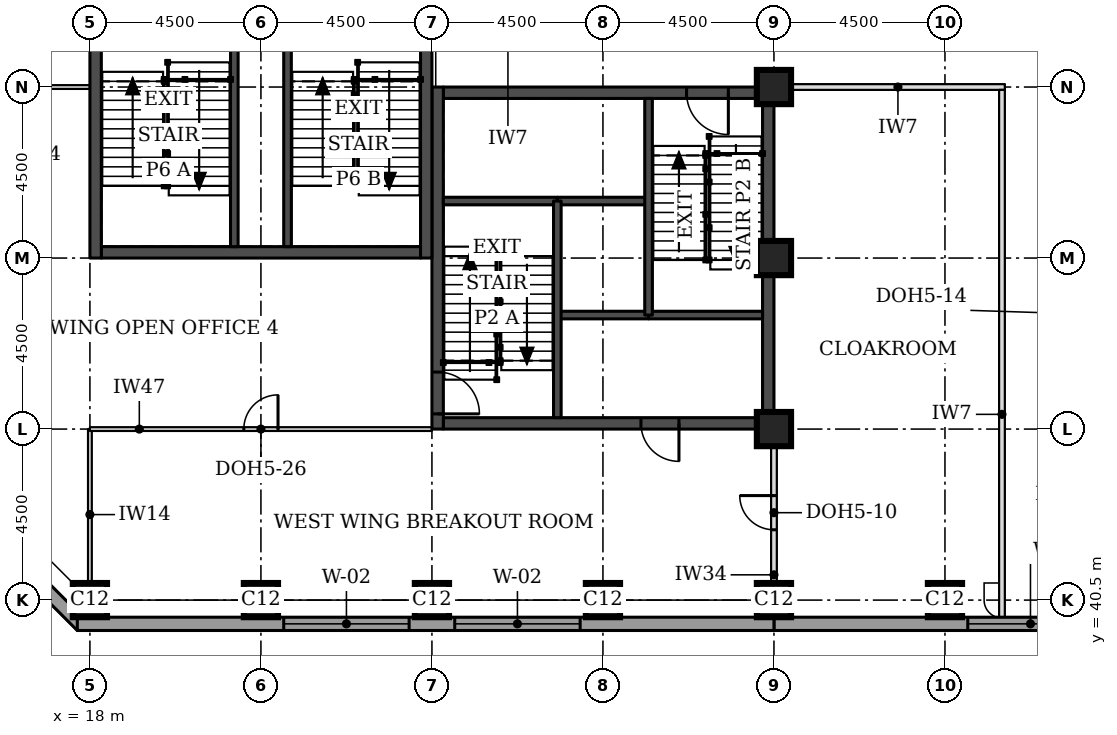
"""IFC4 building model, lengths in metres.
Left out: names, types, materials, properties, quantities, classifications, styles, units other than length and angle.
Written with IfcOpenShell. Run it as: python <this file> out.ifc"""

import sys

from ifc_helpers import new_model, si_unit, direction, frame, frame_2d, origin, origin_2d, place, context, subcontext, project, spatial, rectangle, extrude, element, fill, save


model = new_model("IFC4")
c1 = context("Model", 3, precision=1e-05, world=origin(), true_north=direction((0.0, 1.0)))
c2 = subcontext(c1, "Body", "Model", "MODEL_VIEW")
j1 = project(units=[si_unit("LENGTHUNIT", "METRE"), si_unit("PLANEANGLEUNIT", "RADIAN")], contexts=[c1])
p1 = place(None, origin())
s1 = spatial("IfcSite", under=j1, at=p1, CompositionType="ELEMENT")
p2 = place(p1, origin())
s2 = spatial("IfcBuilding", under=s1, at=p2, CompositionType="ELEMENT")
p3 = place(p2, frame((0.0, 0.0, 177.3)))
s3 = spatial("IfcBuildingStorey", under=s2, at=p3, CompositionType="ELEMENT", Elevation=177.3)
for number, where, z_axis, x_axis in (
    (1, (18.0, 40.5, 0.0), (0.0, 0.0, 1.0), (1.0, 0.0, 0.0)),
    (2, (22.5, 40.5, 0.0), (0.0, 0.0, 1.0), (1.0, 0.0, 0.0)),
    (3, (27.0, 40.5, 0.0), (0.0, 0.0, 1.0), (1.0, 0.0, 0.0)),
    (4, (31.5, 40.5, 0.0), (0.0, 0.0, 1.0), (1.0, 0.0, 0.0)),
    (5, (36.0, 40.5, 0.0), (0.0, 0.0, 1.0), (1.0, 0.0, 0.0)),
    (6, (40.5, 40.5, 0.0), (0.0, 0.0, 1.0), (1.0, 0.0, 0.0)),
    (7, (36.0, 45.0, 0.0), (0.0, 0.0, 1.0), (1.0, 0.0, 0.0)),
    (8, (36.0, 49.5, 0.0), (0.0, 0.0, 1.0), (1.0, 0.0, 0.0)),
    (9, (36.0, 54.0, 0.0), (0.0, 0.0, 1.0), (1.0, 0.0, 0.0)),
):
    element("IfcColumn", number, at=place(p3, frame(where, z_axis=z_axis, x_axis=x_axis)), inside=s3, PredefinedType="COLUMN", context=c2, shape_type="SweptSolid", body=[
        extrude(rectangle(XDim=0.9, YDim=0.9, at=origin_2d()), origin(), (0.0, 0.0, 1.0), 3.7),
    ])
p4 = place(p3, frame((27.3, 45.15, 0.0), z_axis=(0.0, 0.0, 1.0), x_axis=(1.0, 0.0, 0.0)))
e10 = element("IfcWall", 10, at=p4, inside=s3, PredefinedType="SHEAR", context=c2, shape_type="SweptSolid", body=[
    extrude(rectangle(XDim=8.4, YDim=0.3, at=frame_2d((4.2, 0.0))), origin(), (0.0, 0.0, 1.0), 3.7),
])
p5 = place(p4, frame((5.2, 0.0, 0.0)))
e11 = element("IfcOpeningElement", 11, at=p5, cuts=e10, PredefinedType="OPENING", context=c2, shape_type="SweptSolid", body=[
    extrude(rectangle(XDim=1.0, YDim=2.1, at=frame_2d((0.5, 1.05))), frame((0.0, 0.16, 0.0), z_axis=(0.0, -1.0, 0.0), x_axis=(1.0, 0.0, 0.0)), (0.0, 0.0, 1.0), 0.32),
])
p6 = place(p3, frame((27.3, 53.85, 0.0), z_axis=(0.0, 0.0, 1.0), x_axis=(1.0, 0.0, 0.0)))
e12 = element("IfcWall", 12, at=p6, inside=s3, PredefinedType="SHEAR", context=c2, shape_type="SweptSolid", body=[
    extrude(rectangle(XDim=8.4, YDim=0.3, at=frame_2d((4.2, 0.0))), origin(), (0.0, 0.0, 1.0), 3.7),
])
p7 = place(p6, frame((6.4, 0.0, 0.0)))
e13 = element("IfcOpeningElement", 13, at=p7, cuts=e12, PredefinedType="OPENING", context=c2, shape_type="SweptSolid", body=[
    extrude(rectangle(XDim=1.1, YDim=2.1, at=frame_2d((0.55, 1.05))), frame((0.0, 0.16, 0.0), z_axis=(0.0, -1.0, 0.0), x_axis=(1.0, 0.0, 0.0)), (0.0, 0.0, 1.0), 0.32),
])
p8 = place(p3, frame((27.15, 45.0, 0.0), z_axis=(0.0, 0.0, 1.0), x_axis=(0.0, 1.0, 0.0)))
e14 = element("IfcWall", 14, at=p8, inside=s3, PredefinedType="SHEAR", context=c2, shape_type="SweptSolid", body=[
    extrude(rectangle(XDim=9.0, YDim=0.3, at=frame_2d((4.5, 0.0))), origin(), (0.0, 0.0, 1.0), 3.7),
])
p9 = place(p8, frame((0.4, 0.0, 0.0)))
e15 = element("IfcOpeningElement", 15, at=p9, cuts=e14, PredefinedType="OPENING", context=c2, shape_type="SweptSolid", body=[
    extrude(rectangle(XDim=1.1, YDim=2.1, at=frame_2d((0.55, 1.05))), frame((0.0, 0.16, 0.0), z_axis=(0.0, -1.0, 0.0), x_axis=(1.0, 0.0, 0.0)), (0.0, 0.0, 1.0), 0.32),
])
p10 = place(p3, frame((35.85, 45.0, 0.0), z_axis=(0.0, 0.0, 1.0), x_axis=(0.0, 1.0, 0.0)))
e16 = element("IfcWall", 16, at=p10, inside=s3, PredefinedType="SHEAR", context=c2, shape_type="SweptSolid", body=[
    extrude(rectangle(XDim=9.0, YDim=0.3, at=frame_2d((4.5, 0.0))), origin(), (0.0, 0.0, 1.0), 3.7),
])
p11 = place(p3, frame((18.3, 49.65, 0.0), z_axis=(0.0, 0.0, 1.0), x_axis=(1.0, 0.0, 0.0)))
e17 = element("IfcWall", 17, at=p11, inside=s3, PredefinedType="SHEAR", context=c2, shape_type="SweptSolid", body=[
    extrude(rectangle(XDim=8.4, YDim=0.3, at=frame_2d((4.2, 0.0))), origin(), (0.0, 0.0, 1.0), 3.7),
])
p12 = place(p3, frame((18.15, 49.5, 0.0), z_axis=(0.0, 0.0, 1.0), x_axis=(0.0, 1.0, 0.0)))
e18 = element("IfcWall", 18, at=p12, inside=s3, PredefinedType="SHEAR", context=c2, shape_type="SweptSolid", body=[
    extrude(rectangle(XDim=9.0, YDim=0.3, at=frame_2d((4.5, 0.0))), origin(), (0.0, 0.0, 1.0), 3.7),
])
p13 = place(p3, frame((26.85, 49.5, 0.0), z_axis=(0.0, 0.0, 1.0), x_axis=(0.0, 1.0, 0.0)))
e19 = element("IfcWall", 19, at=p13, inside=s3, PredefinedType="SHEAR", context=c2, shape_type="SweptSolid", body=[
    extrude(rectangle(XDim=9.0, YDim=0.3, at=frame_2d((4.5, 0.0))), origin(), (0.0, 0.0, 1.0), 3.7),
])
p14 = place(p13, frame((6.6, 0.0, 0.0)))
e20 = element("IfcOpeningElement", 20, at=p14, cuts=e19, PredefinedType="OPENING", context=c2, shape_type="SweptSolid", body=[
    extrude(rectangle(XDim=1.8, YDim=2.1, at=frame_2d((0.9, 1.05))), frame((0.0, 0.16, 0.0), z_axis=(0.0, -1.0, 0.0), x_axis=(1.0, 0.0, 0.0)), (0.0, 0.0, 1.0), 0.32),
])
p15 = place(p3, frame((36.0, 39.875, 0.0), z_axis=(0.0, 0.0, 1.0), x_axis=(1.0, 0.0, 0.0)))
e21 = element("IfcWall", 21, at=p15, inside=s3, PredefinedType="STANDARD", context=c2, shape_type="SweptSolid", body=[
    extrude(rectangle(XDim=36.331, YDim=0.35, at=frame_2d((18.166, 0.0))), origin(), (0.0, 0.0, 1.0), 3.525),
])
p16 = place(p15, frame((5.1, 0.0, 0.9)))
e22 = element("IfcOpeningElement", 22, at=p16, cuts=e21, PredefinedType="OPENING", context=c2, shape_type="SweptSolid", body=[
    extrude(rectangle(XDim=3.3, YDim=1.9, at=frame_2d((1.65, 0.95))), frame((0.0, 0.185, 0.0), z_axis=(0.0, -1.0, 0.0), x_axis=(1.0, 0.0, 0.0)), (0.0, 0.0, 1.0), 0.37),
])
p17 = place(p15, frame((9.6, 0.0, 0.9)))
e23 = element("IfcOpeningElement", 23, at=p17, cuts=e21, PredefinedType="OPENING", context=c2, shape_type="SweptSolid", body=[
    extrude(rectangle(XDim=3.3, YDim=1.9, at=frame_2d((1.65, 0.95))), frame((0.0, 0.185, 0.0), z_axis=(0.0, -1.0, 0.0), x_axis=(1.0, 0.0, 0.0)), (0.0, 0.0, 1.0), 0.37),
])
p18 = place(p15, frame((14.1, 0.0, 0.9)))
e24 = element("IfcOpeningElement", 24, at=p18, cuts=e21, PredefinedType="OPENING", context=c2, shape_type="SweptSolid", body=[
    extrude(rectangle(XDim=3.3, YDim=1.9, at=frame_2d((1.65, 0.95))), frame((0.0, 0.185, 0.0), z_axis=(0.0, -1.0, 0.0), x_axis=(1.0, 0.0, 0.0)), (0.0, 0.0, 1.0), 0.37),
])
p19 = place(p15, frame((18.6, 0.0, 0.9)))
e25 = element("IfcOpeningElement", 25, at=p19, cuts=e21, PredefinedType="OPENING", context=c2, shape_type="SweptSolid", body=[
    extrude(rectangle(XDim=3.3, YDim=1.9, at=frame_2d((1.65, 0.95))), frame((0.0, 0.185, 0.0), z_axis=(0.0, -1.0, 0.0), x_axis=(1.0, 0.0, 0.0)), (0.0, 0.0, 1.0), 0.37),
])
p20 = place(p15, frame((23.1, 0.0, 0.9)))
e26 = element("IfcOpeningElement", 26, at=p20, cuts=e21, PredefinedType="OPENING", context=c2, shape_type="SweptSolid", body=[
    extrude(rectangle(XDim=3.3, YDim=1.9, at=frame_2d((1.65, 0.95))), frame((0.0, 0.185, 0.0), z_axis=(0.0, -1.0, 0.0), x_axis=(1.0, 0.0, 0.0)), (0.0, 0.0, 1.0), 0.37),
])
p21 = place(p15, frame((27.6, 0.0, 0.9)))
e27 = element("IfcOpeningElement", 27, at=p21, cuts=e21, PredefinedType="OPENING", context=c2, shape_type="SweptSolid", body=[
    extrude(rectangle(XDim=3.3, YDim=1.9, at=frame_2d((1.65, 0.95))), frame((0.0, 0.185, 0.0), z_axis=(0.0, -1.0, 0.0), x_axis=(1.0, 0.0, 0.0)), (0.0, 0.0, 1.0), 0.37),
])
p22 = place(p3, frame((12.824, 44.792, 0.0), z_axis=(0.0, 0.0, 1.0), x_axis=(0.707106781187, -0.707106781187, 0.0)))
e28 = element("IfcWall", 28, at=p22, inside=s3, PredefinedType="STANDARD", context=c2, shape_type="SweptSolid", body=[
    extrude(rectangle(XDim=7.027, YDim=0.35, at=frame_2d((3.513, 0.0))), origin(), (0.0, 0.0, 1.0), 3.525),
])
p23 = place(p22, frame((1.863, 0.0, 0.9)))
e29 = element("IfcOpeningElement", 29, at=p23, cuts=e28, PredefinedType="OPENING", context=c2, shape_type="SweptSolid", body=[
    extrude(rectangle(XDim=3.3, YDim=1.9, at=frame_2d((1.65, 0.95))), frame((0.0, 0.185, 0.0), z_axis=(0.0, -1.0, 0.0), x_axis=(1.0, 0.0, 0.0)), (0.0, 0.0, 1.0), 0.37),
])
p24 = place(p3, frame((17.669, 39.875, 0.0), z_axis=(0.0, 0.0, 1.0), x_axis=(1.0, 0.0, 0.0)))
e30 = element("IfcWall", 30, at=p24, inside=s3, PredefinedType="STANDARD", context=c2, shape_type="SweptSolid", body=[
    extrude(rectangle(XDim=18.331, YDim=0.35, at=frame_2d((9.166, 0.0))), origin(), (0.0, 0.0, 1.0), 3.525),
])
p25 = place(p24, frame((5.431, 0.0, 0.9)))
e31 = element("IfcOpeningElement", 31, at=p25, cuts=e30, PredefinedType="OPENING", context=c2, shape_type="SweptSolid", body=[
    extrude(rectangle(XDim=3.3, YDim=1.9, at=frame_2d((1.65, 0.95))), frame((0.0, 0.185, 0.0), z_axis=(0.0, -1.0, 0.0), x_axis=(1.0, 0.0, 0.0)), (0.0, 0.0, 1.0), 0.37),
])
p26 = place(p24, frame((9.931, 0.0, 0.9)))
e32 = element("IfcOpeningElement", 32, at=p26, cuts=e30, PredefinedType="OPENING", context=c2, shape_type="SweptSolid", body=[
    extrude(rectangle(XDim=3.3, YDim=1.9, at=frame_2d((1.65, 0.95))), frame((0.0, 0.185, 0.0), z_axis=(0.0, -1.0, 0.0), x_axis=(1.0, 0.0, 0.0)), (0.0, 0.0, 1.0), 0.37),
])
p27 = place(p3, frame((36.45, 54.0, 0.0), z_axis=(0.0, 0.0, 1.0), x_axis=(1.0, 0.0, 0.0)))
e33 = element("IfcWall", 33, at=p27, inside=s3, PredefinedType="PARTITIONING", context=c2, shape_type="SweptSolid", body=[
    extrude(rectangle(XDim=5.625, YDim=0.15, at=frame_2d((2.812, 0.0))), origin(), (0.0, 0.0, 1.0), 3.55),
])
p28 = place(p3, frame((42.0, 40.05, 0.0), z_axis=(0.0, 0.0, 1.0), x_axis=(0.0, 1.0, 0.0)))
e34 = element("IfcWall", 34, at=p28, inside=s3, PredefinedType="PARTITIONING", context=c2, shape_type="SweptSolid", body=[
    extrude(rectangle(XDim=13.875, YDim=0.15, at=frame_2d((6.938, 0.0))), origin(), (0.0, 0.0, 1.0), 3.55),
])
p29 = place(p3, frame((36.0, 40.95, 0.0), z_axis=(0.0, 0.0, 1.0), x_axis=(0.0, 1.0, 0.0)))
e35 = element("IfcWall", 35, at=p29, inside=s3, PredefinedType="PARTITIONING", context=c2, shape_type="SweptSolid", body=[
    extrude(rectangle(XDim=3.63, YDim=0.15, at=frame_2d((1.815, 0.0))), origin(), (0.0, 0.0, 1.0), 2.8),
])
p30 = place(p29, frame((1.4, 0.0, 0.0)))
e36 = element("IfcOpeningElement", 36, at=p30, cuts=e35, PredefinedType="OPENING", context=c2, shape_type="SweptSolid", body=[
    extrude(rectangle(XDim=0.9, YDim=2.1, at=frame_2d((0.45, 1.05))), frame((0.0, 0.085, 0.0), z_axis=(0.0, -1.0, 0.0), x_axis=(1.0, 0.0, 0.0)), (0.0, 0.0, 1.0), 0.17),
])
p31 = place(p3, frame((13.5, 54.0, 0.0), z_axis=(0.0, 0.0, 1.0), x_axis=(1.0, 0.0, 0.0)))
e37 = element("IfcWall", 37, at=p31, inside=s3, PredefinedType="PARTITIONING", context=c2, shape_type="SweptSolid", body=[
    extrude(rectangle(XDim=4.5, YDim=0.1, at=frame_2d((2.25, 0.0))), origin(), (0.0, 0.0, 1.0), 3.55),
])
p32 = place(p31, frame((1.8, 0.0, 0.0)))
e38 = element("IfcOpeningElement", 38, at=p32, cuts=e37, PredefinedType="OPENING", context=c2, shape_type="SweptSolid", body=[
    extrude(rectangle(XDim=0.9, YDim=2.1, at=frame_2d((0.45, 1.05))), frame((0.0, 0.06, 0.0), z_axis=(0.0, -1.0, 0.0), x_axis=(1.0, 0.0, 0.0)), (0.0, 0.0, 1.0), 0.12),
])
p33 = place(p3, frame((18.0, 40.5, 0.0), z_axis=(0.0, 0.0, 1.0), x_axis=(0.0, 1.0, 0.0)))
e39 = element("IfcWall", 39, at=p33, inside=s3, PredefinedType="PARTITIONING", context=c2, shape_type="SweptSolid", body=[
    extrude(rectangle(XDim=4.5, YDim=0.1, at=frame_2d((2.25, 0.0))), origin(), (0.0, 0.0, 1.0), 3.55),
])
p34 = place(p3, frame((18.0, 45.0, 0.0), z_axis=(0.0, 0.0, 1.0), x_axis=(1.0, 0.0, 0.0)))
e40 = element("IfcWall", 40, at=p34, inside=s3, PredefinedType="PARTITIONING", context=c2, shape_type="SweptSolid", body=[
    extrude(rectangle(XDim=9.0, YDim=0.1, at=frame_2d((4.5, 0.0))), origin(), (0.0, 0.0, 1.0), 2.55),
])
p35 = place(p34, frame((4.05, 0.0, 0.0)))
e41 = element("IfcOpeningElement", 41, at=p35, cuts=e40, PredefinedType="OPENING", context=c2, shape_type="SweptSolid", body=[
    extrude(rectangle(XDim=0.9, YDim=2.1, at=frame_2d((0.45, 1.05))), frame((0.0, 0.06, 0.0), z_axis=(0.0, -1.0, 0.0), x_axis=(1.0, 0.0, 0.0)), (0.0, 0.0, 1.0), 0.12),
])
p36 = place(p3, frame((30.3, 48.0, 0.0), z_axis=(0.0, 0.0, 1.0), x_axis=(1.0, 0.0, 0.0)))
e42 = element("IfcWall", 42, at=p36, inside=s3, PredefinedType="SOLIDWALL", context=c2, shape_type="SweptSolid", body=[
    extrude(rectangle(XDim=2.4, YDim=0.2, at=frame_2d((1.2, 0.0))), origin(), (0.0, 0.0, 1.0), 3.55),
])
p37 = place(p3, frame((32.7, 48.0, 0.0), z_axis=(0.0, 0.0, 1.0), x_axis=(1.0, 0.0, 0.0)))
e43 = element("IfcWall", 43, at=p37, inside=s3, PredefinedType="SOLIDWALL", context=c2, shape_type="SweptSolid", body=[
    extrude(rectangle(XDim=3.0, YDim=0.2, at=frame_2d((1.5, 0.0))), origin(), (0.0, 0.0, 1.0), 3.55),
])
p38 = place(p3, frame((30.3, 51.0, 0.0), z_axis=(0.0, 0.0, 1.0), x_axis=(1.0, 0.0, 0.0)))
e44 = element("IfcWall", 44, at=p38, inside=s3, PredefinedType="SOLIDWALL", context=c2, shape_type="SweptSolid", body=[
    extrude(rectangle(XDim=2.4, YDim=0.2, at=frame_2d((1.2, 0.0))), origin(), (0.0, 0.0, 1.0), 3.7),
])
p39 = place(p3, frame((27.3, 51.0, 0.0), z_axis=(0.0, 0.0, 1.0), x_axis=(1.0, 0.0, 0.0)))
e45 = element("IfcWall", 45, at=p39, inside=s3, PredefinedType="SOLIDWALL", context=c2, shape_type="SweptSolid", body=[
    extrude(rectangle(XDim=3.0, YDim=0.2, at=frame_2d((1.5, 0.0))), origin(), (0.0, 0.0, 1.0), 3.55),
])
for number, where, z_axis, x_axis in (
    (46, (30.3, 45.3, 0.0), (0.0, 0.0, 1.0), (0.0, 1.0, 0.0)),
    (47, (32.7, 48.0, 0.0), (0.0, 0.0, 1.0), (0.0, 1.0, 0.0)),
):
    element("IfcWall", number, at=place(p3, frame(where, z_axis=z_axis, x_axis=x_axis)), inside=s3, PredefinedType="SOLIDWALL", context=c2, shape_type="SweptSolid", body=[
        extrude(rectangle(XDim=5.7, YDim=0.2, at=frame_2d((2.85, 0.0))), origin(), (0.0, 0.0, 1.0), 3.55),
    ])
for number, where, z_axis, x_axis in (
    (48, (21.8, 49.8, 0.0), (0.0, 0.0, 1.0), (0.0, 1.0, 0.0)),
    (49, (23.2, 49.8, 0.0), (0.0, 0.0, 1.0), (0.0, 1.0, 0.0)),
):
    element("IfcWall", number, at=place(p3, frame(where, z_axis=z_axis, x_axis=x_axis)), inside=s3, PredefinedType="SOLIDWALL", context=c2, shape_type="SweptSolid", body=[
        extrude(rectangle(XDim=6.05, YDim=0.2, at=frame_2d((3.025, 0.0))), origin(), (0.0, 0.0, 1.0), 3.55),
    ])
p40 = place(p16, origin())
e50 = element("IfcWindow", 50, at=p40, inside=s3, PartitioningType="SINGLE_PANEL", PredefinedType="WINDOW", context=c2, shape_type="SweptSolid", body=[
    extrude(rectangle(XDim=3.3, YDim=1.9, at=frame_2d((1.65, 0.95))), frame((0.0, 0.085, 0.0), z_axis=(0.0, -1.0, 0.0), x_axis=(1.0, 0.0, 0.0)), (0.0, 0.0, 1.0), 0.06),
])
fill(e22, e50)
p41 = place(p25, origin())
e51 = element("IfcWindow", 51, at=p41, inside=s3, PartitioningType="SINGLE_PANEL", PredefinedType="WINDOW", context=c2, shape_type="SweptSolid", body=[
    extrude(rectangle(XDim=3.3, YDim=1.9, at=frame_2d((1.65, 0.95))), frame((0.0, 0.085, 0.0), z_axis=(0.0, -1.0, 0.0), x_axis=(1.0, 0.0, 0.0)), (0.0, 0.0, 1.0), 0.06),
])
fill(e31, e51)
p42 = place(p26, origin())
e52 = element("IfcWindow", 52, at=p42, inside=s3, PartitioningType="SINGLE_PANEL", PredefinedType="WINDOW", context=c2, shape_type="SweptSolid", body=[
    extrude(rectangle(XDim=3.3, YDim=1.9, at=frame_2d((1.65, 0.95))), frame((0.0, 0.085, 0.0), z_axis=(0.0, -1.0, 0.0), x_axis=(1.0, 0.0, 0.0)), (0.0, 0.0, 1.0), 0.06),
])
fill(e32, e52)
p43 = place(p30, origin())
e53 = element("IfcDoor", 53, at=p43, inside=s3, OperationType="SINGLE_SWING_RIGHT", PredefinedType="DOOR", context=c2, shape_type="SweptSolid", body=[
    extrude(rectangle(XDim=0.9, YDim=2.1, at=frame_2d((0.45, 1.05))), frame((0.0, 0.025, 0.0), z_axis=(0.0, -1.0, 0.0), x_axis=(1.0, 0.0, 0.0)), (0.0, 0.0, 1.0), 0.05),
])
fill(e36, e53)
p44 = place(p35, origin())
e54 = element("IfcDoor", 54, at=p44, inside=s3, OperationType="SINGLE_SWING_RIGHT", PredefinedType="DOOR", context=c2, shape_type="SweptSolid", body=[
    extrude(rectangle(XDim=0.9, YDim=2.1, at=frame_2d((0.45, 1.05))), frame((0.0, 0.025, 0.0), z_axis=(0.0, -1.0, 0.0), x_axis=(1.0, 0.0, 0.0)), (0.0, 0.0, 1.0), 0.05),
])
fill(e41, e54)
p45 = place(p9, frame((1.1, 0.0, 0.0), z_axis=(0.0, 0.0, 1.0), x_axis=(-1.0, 0.0, 0.0)))
e55 = element("IfcDoor", 55, at=p45, inside=s3, OperationType="SINGLE_SWING_RIGHT", PredefinedType="DOOR", context=c2, shape_type="SweptSolid", body=[
    extrude(rectangle(XDim=1.1, YDim=2.1, at=frame_2d((0.55, 1.05))), frame((0.0, 0.025, 0.0), z_axis=(0.0, -1.0, 0.0), x_axis=(1.0, 0.0, 0.0)), (0.0, 0.0, 1.0), 0.05),
])
fill(e15, e55)
p46 = place(p7, frame((1.1, 0.0, 0.0), z_axis=(0.0, 0.0, 1.0), x_axis=(-1.0, 0.0, 0.0)))
e56 = element("IfcDoor", 56, at=p46, inside=s3, OperationType="SINGLE_SWING_LEFT", PredefinedType="DOOR", context=c2, shape_type="SweptSolid", body=[
    extrude(rectangle(XDim=1.1, YDim=2.1, at=frame_2d((0.55, 1.05))), frame((0.0, 0.025, 0.0), z_axis=(0.0, -1.0, 0.0), x_axis=(1.0, 0.0, 0.0)), (0.0, 0.0, 1.0), 0.05),
])
fill(e13, e56)
p47 = place(p5, frame((1.0, 0.0, 0.0), z_axis=(0.0, 0.0, 1.0), x_axis=(-1.0, 0.0, 0.0)))
e57 = element("IfcDoor", 57, at=p47, inside=s3, OperationType="SINGLE_SWING_LEFT", PredefinedType="DOOR", context=c2, shape_type="SweptSolid", body=[
    extrude(rectangle(XDim=1.0, YDim=2.1, at=frame_2d((0.5, 1.05))), frame((0.0, 0.025, 0.0), z_axis=(0.0, -1.0, 0.0), x_axis=(1.0, 0.0, 0.0)), (0.0, 0.0, 1.0), 0.05),
])
fill(e11, e57)
save(model, sys.argv[1])
